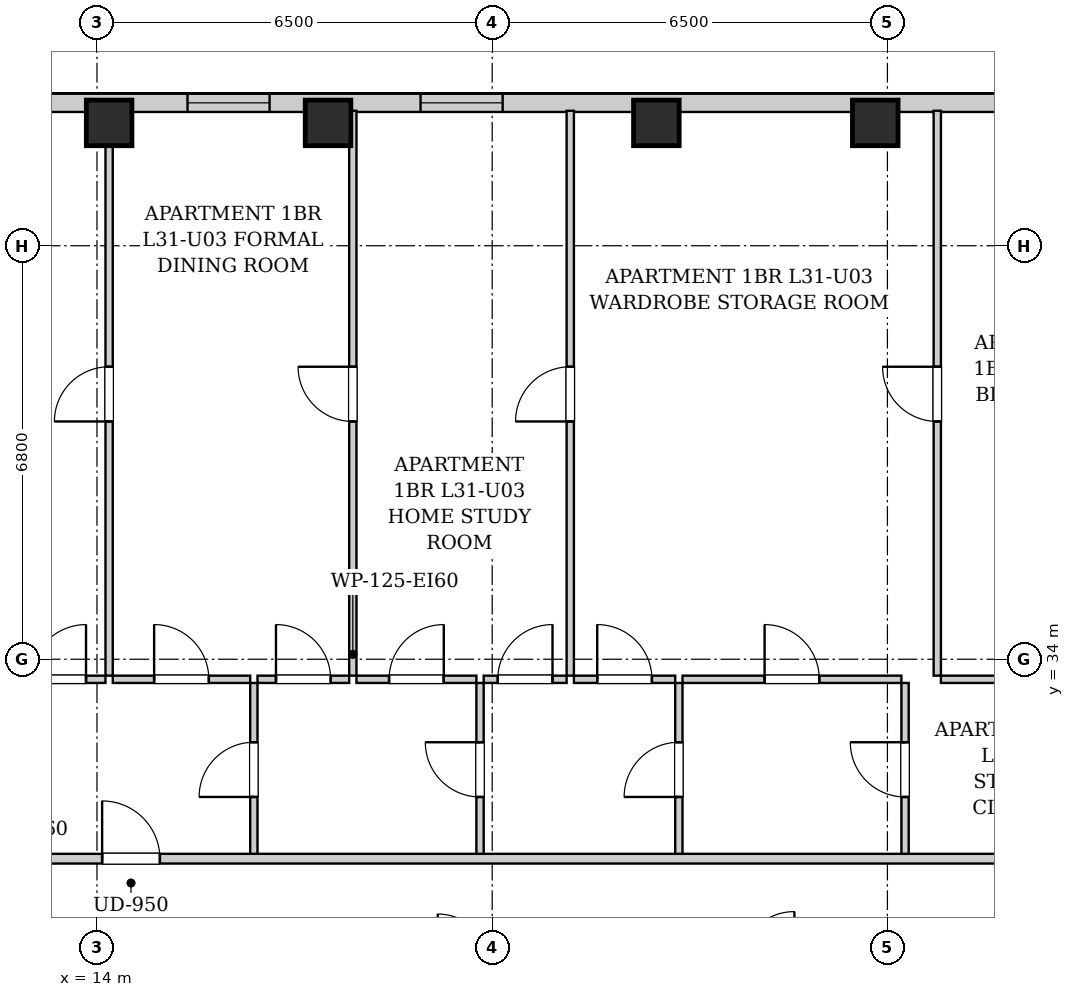
"""IFC4 building model, lengths in metres.
Left out: names, types, materials, properties, quantities, classifications, styles, units other than length and angle.
Written with IfcOpenShell. Run it as: python <this file> out.ifc"""

import sys

from ifc_helpers import new_model, si_unit, direction, frame, frame_2d, origin, origin_2d, place, context, subcontext, project, spatial, rectangle, extrude, element, fill, save


model = new_model("IFC4")
c1 = context("Model", 3, precision=1e-05, world=origin(), true_north=direction((0.0, 1.0)))
c2 = subcontext(c1, "Body", "Model", "MODEL_VIEW")
j1 = project(units=[si_unit("LENGTHUNIT", "METRE"), si_unit("PLANEANGLEUNIT", "RADIAN")], contexts=[c1])
p1 = place(None, origin())
s1 = spatial("IfcSite", under=j1, at=p1, CompositionType="ELEMENT")
p2 = place(p1, origin())
s2 = spatial("IfcBuilding", under=s1, at=p2, CompositionType="ELEMENT")
p3 = place(p2, frame((0.0, 0.0, 110.3)))
s3 = spatial("IfcBuildingStorey", under=s2, at=p3, CompositionType="ELEMENT", Elevation=110.3)
for number, where, z_axis, x_axis in (
    (1, (14.2, 42.82, 0.0), (0.0, 0.0, 1.0), (1.0, 0.0, 0.0)),
    (2, (17.8, 42.82, 0.0), (0.0, 0.0, 1.0), (1.0, 0.0, 0.0)),
    (3, (23.2, 42.82, 0.0), (0.0, 0.0, 1.0), (1.0, 0.0, 0.0)),
    (4, (26.8, 42.82, 0.0), (0.0, 0.0, 1.0), (1.0, 0.0, 0.0)),
):
    element("IfcColumn", number, at=place(p3, frame(where, z_axis=z_axis, x_axis=x_axis)), inside=s3, PredefinedType="COLUMN", context=c2, shape_type="SweptSolid", body=[
        extrude(rectangle(XDim=0.75, YDim=0.75, at=origin_2d()), origin(), (0.0, 0.0, 1.0), 3.2),
    ])
p4 = place(p3, frame((10.0, 43.15, 0.0), z_axis=(0.0, 0.0, 1.0), x_axis=(1.0, 0.0, 0.0)))
e5 = element("IfcWall", 5, at=p4, inside=s3, PredefinedType="SOLIDWALL", context=c2, shape_type="SweptSolid", body=[
    extrude(rectangle(XDim=21.95, YDim=0.3, at=frame_2d((10.975, 0.0))), origin(), (0.0, 0.0, 1.0), 2.94),
])
p5 = place(p4, frame((5.489, 0.0, 0.55)))
e6 = element("IfcOpeningElement", 6, at=p5, cuts=e5, PredefinedType="OPENING", context=c2, shape_type="SweptSolid", body=[
    extrude(rectangle(XDim=1.35, YDim=1.2, at=frame_2d((0.675, 0.6))), frame((0.0, 0.16, 0.0), z_axis=(0.0, -1.0, 0.0), x_axis=(1.0, 0.0, 0.0)), (0.0, 0.0, 1.0), 0.32),
])
p6 = place(p4, frame((9.322, 0.0, 0.55)))
e7 = element("IfcOpeningElement", 7, at=p6, cuts=e5, PredefinedType="OPENING", context=c2, shape_type="SweptSolid", body=[
    extrude(rectangle(XDim=1.35, YDim=1.2, at=frame_2d((0.675, 0.6))), frame((0.0, 0.16, 0.0), z_axis=(0.0, -1.0, 0.0), x_axis=(1.0, 0.0, 0.0)), (0.0, 0.0, 1.0), 0.32),
])
p7 = place(p4, frame((18.869, 0.0, 0.55)))
e8 = element("IfcOpeningElement", 8, at=p7, cuts=e5, PredefinedType="OPENING", context=c2, shape_type="SweptSolid", body=[
    extrude(rectangle(XDim=1.35, YDim=1.2, at=frame_2d((0.675, 0.6))), frame((0.0, 0.16, 0.0), z_axis=(0.0, -1.0, 0.0), x_axis=(1.0, 0.0, 0.0)), (0.0, 0.0, 1.0), 0.32),
])
p8 = place(p3, frame((16.58, 30.76, 0.0), z_axis=(0.0, 0.0, 1.0), x_axis=(0.0, 1.0, 0.0)))
e9 = element("IfcWall", 9, at=p8, inside=s3, PredefinedType="PARTITIONING", context=c2, shape_type="SweptSolid", body=[
    extrude(rectangle(XDim=2.85, YDim=0.12, at=frame_2d((1.425, 0.0))), origin(), (0.0, 0.0, 1.0), 2.94),
])
p9 = place(p8, frame((0.975, 0.0, 0.0)))
e10 = element("IfcOpeningElement", 10, at=p9, cuts=e9, PredefinedType="OPENING", context=c2, shape_type="SweptSolid", body=[
    extrude(rectangle(XDim=0.9, YDim=2.05, at=frame_2d((0.45, 1.025))), frame((0.0, 0.07, 0.0), z_axis=(0.0, -1.0, 0.0), x_axis=(1.0, 0.0, 0.0)), (0.0, 0.0, 1.0), 0.14),
])
p10 = place(p3, frame((12.6, 33.67, 0.0), z_axis=(0.0, 0.0, 1.0), x_axis=(1.0, 0.0, 0.0)))
e11 = element("IfcWall", 11, at=p10, inside=s3, PredefinedType="PARTITIONING", context=c2, shape_type="SweptSolid", body=[
    extrude(rectangle(XDim=1.54, YDim=0.12, at=frame_2d((0.77, 0.0))), origin(), (0.0, 0.0, 1.0), 2.94),
])
p11 = place(p10, frame((0.32, 0.0, 0.0)))
e12 = element("IfcOpeningElement", 12, at=p11, cuts=e11, PredefinedType="OPENING", context=c2, shape_type="SweptSolid", body=[
    extrude(rectangle(XDim=0.9, YDim=2.05, at=frame_2d((0.45, 1.025))), frame((0.0, 0.07, 0.0), z_axis=(0.0, -1.0, 0.0), x_axis=(1.0, 0.0, 0.0)), (0.0, 0.0, 1.0), 0.14),
])
p12 = place(p3, frame((14.26, 33.67, 0.0), z_axis=(0.0, 0.0, 1.0), x_axis=(1.0, 0.0, 0.0)))
e13 = element("IfcWall", 13, at=p12, inside=s3, PredefinedType="PARTITIONING", context=c2, shape_type="SweptSolid", body=[
    extrude(rectangle(XDim=2.26, YDim=0.12, at=frame_2d((1.13, 0.0))), origin(), (0.0, 0.0, 1.0), 2.94),
])
p13 = place(p12, frame((0.68, 0.0, 0.0)))
e14 = element("IfcOpeningElement", 14, at=p13, cuts=e13, PredefinedType="OPENING", context=c2, shape_type="SweptSolid", body=[
    extrude(rectangle(XDim=0.9, YDim=2.05, at=frame_2d((0.45, 1.025))), frame((0.0, 0.07, 0.0), z_axis=(0.0, -1.0, 0.0), x_axis=(1.0, 0.0, 0.0)), (0.0, 0.0, 1.0), 0.14),
])
p14 = place(p3, frame((20.3, 30.76, 0.0), z_axis=(0.0, 0.0, 1.0), x_axis=(0.0, 1.0, 0.0)))
e15 = element("IfcWall", 15, at=p14, inside=s3, PredefinedType="PARTITIONING", context=c2, shape_type="SweptSolid", body=[
    extrude(rectangle(XDim=2.85, YDim=0.12, at=frame_2d((1.425, 0.0))), origin(), (0.0, 0.0, 1.0), 2.94),
])
p15 = place(p14, frame((0.975, 0.0, 0.0)))
e16 = element("IfcOpeningElement", 16, at=p15, cuts=e15, PredefinedType="OPENING", context=c2, shape_type="SweptSolid", body=[
    extrude(rectangle(XDim=0.9, YDim=2.05, at=frame_2d((0.45, 1.025))), frame((0.0, 0.07, 0.0), z_axis=(0.0, -1.0, 0.0), x_axis=(1.0, 0.0, 0.0)), (0.0, 0.0, 1.0), 0.14),
])
p16 = place(p3, frame((16.64, 33.67, 0.0), z_axis=(0.0, 0.0, 1.0), x_axis=(1.0, 0.0, 0.0)))
e17 = element("IfcWall", 17, at=p16, inside=s3, PredefinedType="PARTITIONING", context=c2, shape_type="SweptSolid", body=[
    extrude(rectangle(XDim=1.508, YDim=0.12, at=frame_2d((0.754, 0.0))), origin(), (0.0, 0.0, 1.0), 2.94),
])
p17 = place(p16, frame((0.304, 0.0, 0.0)))
e18 = element("IfcOpeningElement", 18, at=p17, cuts=e17, PredefinedType="OPENING", context=c2, shape_type="SweptSolid", body=[
    extrude(rectangle(XDim=0.9, YDim=2.05, at=frame_2d((0.45, 1.025))), frame((0.0, 0.07, 0.0), z_axis=(0.0, -1.0, 0.0), x_axis=(1.0, 0.0, 0.0)), (0.0, 0.0, 1.0), 0.14),
])
p18 = place(p3, frame((18.268, 33.67, 0.0), z_axis=(0.0, 0.0, 1.0), x_axis=(1.0, 0.0, 0.0)))
e19 = element("IfcWall", 19, at=p18, inside=s3, PredefinedType="PARTITIONING", context=c2, shape_type="SweptSolid", body=[
    extrude(rectangle(XDim=1.972, YDim=0.12, at=frame_2d((0.986, 0.0))), origin(), (0.0, 0.0, 1.0), 2.94),
])
p19 = place(p18, frame((0.536, 0.0, 0.0)))
e20 = element("IfcOpeningElement", 20, at=p19, cuts=e19, PredefinedType="OPENING", context=c2, shape_type="SweptSolid", body=[
    extrude(rectangle(XDim=0.9, YDim=2.05, at=frame_2d((0.45, 1.025))), frame((0.0, 0.07, 0.0), z_axis=(0.0, -1.0, 0.0), x_axis=(1.0, 0.0, 0.0)), (0.0, 0.0, 1.0), 0.14),
])
p20 = place(p3, frame((23.57, 30.76, 0.0), z_axis=(0.0, 0.0, 1.0), x_axis=(0.0, 1.0, 0.0)))
e21 = element("IfcWall", 21, at=p20, inside=s3, PredefinedType="PARTITIONING", context=c2, shape_type="SweptSolid", body=[
    extrude(rectangle(XDim=2.85, YDim=0.12, at=frame_2d((1.425, 0.0))), origin(), (0.0, 0.0, 1.0), 2.94),
])
p21 = place(p20, frame((0.975, 0.0, 0.0)))
e22 = element("IfcOpeningElement", 22, at=p21, cuts=e21, PredefinedType="OPENING", context=c2, shape_type="SweptSolid", body=[
    extrude(rectangle(XDim=0.9, YDim=2.05, at=frame_2d((0.45, 1.025))), frame((0.0, 0.07, 0.0), z_axis=(0.0, -1.0, 0.0), x_axis=(1.0, 0.0, 0.0)), (0.0, 0.0, 1.0), 0.14),
])
p22 = place(p3, frame((20.36, 33.67, 0.0), z_axis=(0.0, 0.0, 1.0), x_axis=(1.0, 0.0, 0.0)))
e23 = element("IfcWall", 23, at=p22, inside=s3, PredefinedType="PARTITIONING", context=c2, shape_type="SweptSolid", body=[
    extrude(rectangle(XDim=1.364, YDim=0.12, at=frame_2d((0.682, 0.0))), origin(), (0.0, 0.0, 1.0), 2.94),
])
p23 = place(p22, frame((0.232, 0.0, 0.0)))
e24 = element("IfcOpeningElement", 24, at=p23, cuts=e23, PredefinedType="OPENING", context=c2, shape_type="SweptSolid", body=[
    extrude(rectangle(XDim=0.9, YDim=2.05, at=frame_2d((0.45, 1.025))), frame((0.0, 0.07, 0.0), z_axis=(0.0, -1.0, 0.0), x_axis=(1.0, 0.0, 0.0)), (0.0, 0.0, 1.0), 0.14),
])
p24 = place(p3, frame((21.844, 33.67, 0.0), z_axis=(0.0, 0.0, 1.0), x_axis=(1.0, 0.0, 0.0)))
e25 = element("IfcWall", 25, at=p24, inside=s3, PredefinedType="PARTITIONING", context=c2, shape_type="SweptSolid", body=[
    extrude(rectangle(XDim=1.666, YDim=0.12, at=frame_2d((0.833, 0.0))), origin(), (0.0, 0.0, 1.0), 2.94),
])
p25 = place(p24, frame((0.383, 0.0, 0.0)))
e26 = element("IfcOpeningElement", 26, at=p25, cuts=e25, PredefinedType="OPENING", context=c2, shape_type="SweptSolid", body=[
    extrude(rectangle(XDim=0.9, YDim=2.05, at=frame_2d((0.45, 1.025))), frame((0.0, 0.07, 0.0), z_axis=(0.0, -1.0, 0.0), x_axis=(1.0, 0.0, 0.0)), (0.0, 0.0, 1.0), 0.14),
])
p26 = place(p3, frame((27.29, 30.76, 0.0), z_axis=(0.0, 0.0, 1.0), x_axis=(0.0, 1.0, 0.0)))
e27 = element("IfcWall", 27, at=p26, inside=s3, PredefinedType="PARTITIONING", context=c2, shape_type="SweptSolid", body=[
    extrude(rectangle(XDim=2.85, YDim=0.12, at=frame_2d((1.425, 0.0))), origin(), (0.0, 0.0, 1.0), 2.94),
])
p27 = place(p26, frame((0.975, 0.0, 0.0)))
e28 = element("IfcOpeningElement", 28, at=p27, cuts=e27, PredefinedType="OPENING", context=c2, shape_type="SweptSolid", body=[
    extrude(rectangle(XDim=0.9, YDim=2.05, at=frame_2d((0.45, 1.025))), frame((0.0, 0.07, 0.0), z_axis=(0.0, -1.0, 0.0), x_axis=(1.0, 0.0, 0.0)), (0.0, 0.0, 1.0), 0.14),
])
p28 = place(p3, frame((23.63, 33.67, 0.0), z_axis=(0.0, 0.0, 1.0), x_axis=(1.0, 0.0, 0.0)))
e29 = element("IfcWall", 29, at=p28, inside=s3, PredefinedType="PARTITIONING", context=c2, shape_type="SweptSolid", body=[
    extrude(rectangle(XDim=3.6, YDim=0.12, at=frame_2d((1.8, 0.0))), origin(), (0.0, 0.0, 1.0), 2.94),
])
p29 = place(p28, frame((1.35, 0.0, 0.0)))
e30 = element("IfcOpeningElement", 30, at=p29, cuts=e29, PredefinedType="OPENING", context=c2, shape_type="SweptSolid", body=[
    extrude(rectangle(XDim=0.9, YDim=2.05, at=frame_2d((0.45, 1.025))), frame((0.0, 0.07, 0.0), z_axis=(0.0, -1.0, 0.0), x_axis=(1.0, 0.0, 0.0)), (0.0, 0.0, 1.0), 0.14),
])
p30 = place(p3, frame((27.88, 33.67, 0.0), z_axis=(0.0, 0.0, 1.0), x_axis=(1.0, 0.0, 0.0)))
e31 = element("IfcWall", 31, at=p30, inside=s3, PredefinedType="PARTITIONING", context=c2, shape_type="SweptSolid", body=[
    extrude(rectangle(XDim=3.24, YDim=0.12, at=frame_2d((1.62, 0.0))), origin(), (0.0, 0.0, 1.0), 2.94),
])
p31 = place(p30, frame((1.17, 0.0, 0.0)))
e32 = element("IfcOpeningElement", 32, at=p31, cuts=e31, PredefinedType="OPENING", context=c2, shape_type="SweptSolid", body=[
    extrude(rectangle(XDim=0.9, YDim=2.05, at=frame_2d((0.45, 1.025))), frame((0.0, 0.07, 0.0), z_axis=(0.0, -1.0, 0.0), x_axis=(1.0, 0.0, 0.0)), (0.0, 0.0, 1.0), 0.14),
])
p32 = place(p3, frame((14.2, 33.73, 0.0), z_axis=(0.0, 0.0, 1.0), x_axis=(0.0, 1.0, 0.0)))
e33 = element("IfcWall", 33, at=p32, inside=s3, PredefinedType="PARTITIONING", context=c2, shape_type="SweptSolid", body=[
    extrude(rectangle(XDim=9.29, YDim=0.12, at=frame_2d((4.645, 0.0))), origin(), (0.0, 0.0, 1.0), 2.94),
])
p33 = place(p32, frame((4.18, 0.0, 0.0)))
e34 = element("IfcOpeningElement", 34, at=p33, cuts=e33, PredefinedType="OPENING", context=c2, shape_type="SweptSolid", body=[
    extrude(rectangle(XDim=0.9, YDim=2.05, at=frame_2d((0.45, 1.025))), frame((0.0, 0.07, 0.0), z_axis=(0.0, -1.0, 0.0), x_axis=(1.0, 0.0, 0.0)), (0.0, 0.0, 1.0), 0.14),
])
p34 = place(p3, frame((18.208, 33.73, 0.0), z_axis=(0.0, 0.0, 1.0), x_axis=(0.0, 1.0, 0.0)))
e35 = element("IfcWall", 35, at=p34, inside=s3, PredefinedType="PARTITIONING", context=c2, shape_type="SweptSolid", body=[
    extrude(rectangle(XDim=9.29, YDim=0.12, at=frame_2d((4.645, 0.0))), origin(), (0.0, 0.0, 1.0), 2.94),
])
p35 = place(p34, frame((4.18, 0.0, 0.0)))
e36 = element("IfcOpeningElement", 36, at=p35, cuts=e35, PredefinedType="OPENING", context=c2, shape_type="SweptSolid", body=[
    extrude(rectangle(XDim=0.9, YDim=2.05, at=frame_2d((0.45, 1.025))), frame((0.0, 0.07, 0.0), z_axis=(0.0, -1.0, 0.0), x_axis=(1.0, 0.0, 0.0)), (0.0, 0.0, 1.0), 0.14),
])
p36 = place(p3, frame((21.784, 33.73, 0.0), z_axis=(0.0, 0.0, 1.0), x_axis=(0.0, 1.0, 0.0)))
e37 = element("IfcWall", 37, at=p36, inside=s3, PredefinedType="PARTITIONING", context=c2, shape_type="SweptSolid", body=[
    extrude(rectangle(XDim=9.29, YDim=0.12, at=frame_2d((4.645, 0.0))), origin(), (0.0, 0.0, 1.0), 2.94),
])
p37 = place(p36, frame((4.18, 0.0, 0.0)))
e38 = element("IfcOpeningElement", 38, at=p37, cuts=e37, PredefinedType="OPENING", context=c2, shape_type="SweptSolid", body=[
    extrude(rectangle(XDim=0.9, YDim=2.05, at=frame_2d((0.45, 1.025))), frame((0.0, 0.07, 0.0), z_axis=(0.0, -1.0, 0.0), x_axis=(1.0, 0.0, 0.0)), (0.0, 0.0, 1.0), 0.14),
])
p38 = place(p3, frame((27.82, 33.73, 0.0), z_axis=(0.0, 0.0, 1.0), x_axis=(0.0, 1.0, 0.0)))
e39 = element("IfcWall", 39, at=p38, inside=s3, PredefinedType="PARTITIONING", context=c2, shape_type="SweptSolid", body=[
    extrude(rectangle(XDim=9.29, YDim=0.12, at=frame_2d((4.645, 0.0))), origin(), (0.0, 0.0, 1.0), 2.94),
])
p39 = place(p38, frame((4.18, 0.0, 0.0)))
e40 = element("IfcOpeningElement", 40, at=p39, cuts=e39, PredefinedType="OPENING", context=c2, shape_type="SweptSolid", body=[
    extrude(rectangle(XDim=0.9, YDim=2.05, at=frame_2d((0.45, 1.025))), frame((0.0, 0.07, 0.0), z_axis=(0.0, -1.0, 0.0), x_axis=(1.0, 0.0, 0.0)), (0.0, 0.0, 1.0), 0.14),
])
p40 = place(p3, frame((10.05, 30.72, 0.0), z_axis=(0.0, 0.0, 1.0), x_axis=(1.0, 0.0, 0.0)))
e41 = element("IfcWall", 41, at=p40, inside=s3, PredefinedType="PARTITIONING", context=c2, shape_type="SweptSolid", body=[
    extrude(rectangle(XDim=30.8, YDim=0.16, at=frame_2d((15.4, 0.0))), origin(), (0.0, 0.0, 1.0), 2.94),
])
p41 = place(p40, frame((4.035, 0.0, 0.0)))
e42 = element("IfcOpeningElement", 42, at=p41, cuts=e41, PredefinedType="OPENING", context=c2, shape_type="SweptSolid", body=[
    extrude(rectangle(XDim=0.95, YDim=2.1, at=frame_2d((0.475, 1.05))), frame((0.0, 0.09, 0.0), z_axis=(0.0, -1.0, 0.0), x_axis=(1.0, 0.0, 0.0)), (0.0, 0.0, 1.0), 0.18),
])
p42 = place(p40, frame((25.11, 0.0, 0.0)))
e43 = element("IfcOpeningElement", 43, at=p42, cuts=e41, PredefinedType="OPENING", context=c2, shape_type="SweptSolid", body=[
    extrude(rectangle(XDim=0.95, YDim=2.1, at=frame_2d((0.475, 1.05))), frame((0.0, 0.09, 0.0), z_axis=(0.0, -1.0, 0.0), x_axis=(1.0, 0.0, 0.0)), (0.0, 0.0, 1.0), 0.18),
])
p43 = place(p9, origin())
e44 = element("IfcDoor", 44, at=p43, inside=s3, OperationType="SINGLE_SWING_LEFT", PredefinedType="DOOR", context=c2, shape_type="SweptSolid", body=[
    extrude(rectangle(XDim=0.9, YDim=2.05, at=frame_2d((0.45, 1.025))), frame((0.0, 0.025, 0.0), z_axis=(0.0, -1.0, 0.0), x_axis=(1.0, 0.0, 0.0)), (0.0, 0.0, 1.0), 0.05),
])
fill(e10, e44)
p44 = place(p11, origin())
e45 = element("IfcDoor", 45, at=p44, inside=s3, OperationType="SINGLE_SWING_RIGHT", PredefinedType="DOOR", context=c2, shape_type="SweptSolid", body=[
    extrude(rectangle(XDim=0.9, YDim=2.05, at=frame_2d((0.45, 1.025))), frame((0.0, 0.025, 0.0), z_axis=(0.0, -1.0, 0.0), x_axis=(1.0, 0.0, 0.0)), (0.0, 0.0, 1.0), 0.05),
])
fill(e12, e45)
p45 = place(p13, origin())
e46 = element("IfcDoor", 46, at=p45, inside=s3, OperationType="SINGLE_SWING_LEFT", PredefinedType="DOOR", context=c2, shape_type="SweptSolid", body=[
    extrude(rectangle(XDim=0.9, YDim=2.05, at=frame_2d((0.45, 1.025))), frame((0.0, 0.025, 0.0), z_axis=(0.0, -1.0, 0.0), x_axis=(1.0, 0.0, 0.0)), (0.0, 0.0, 1.0), 0.05),
])
fill(e14, e46)
p46 = place(p15, origin())
e47 = element("IfcDoor", 47, at=p46, inside=s3, OperationType="SINGLE_SWING_RIGHT", PredefinedType="DOOR", context=c2, shape_type="SweptSolid", body=[
    extrude(rectangle(XDim=0.9, YDim=2.05, at=frame_2d((0.45, 1.025))), frame((0.0, 0.025, 0.0), z_axis=(0.0, -1.0, 0.0), x_axis=(1.0, 0.0, 0.0)), (0.0, 0.0, 1.0), 0.05),
])
fill(e16, e47)
p47 = place(p17, origin())
e48 = element("IfcDoor", 48, at=p47, inside=s3, OperationType="SINGLE_SWING_LEFT", PredefinedType="DOOR", context=c2, shape_type="SweptSolid", body=[
    extrude(rectangle(XDim=0.9, YDim=2.05, at=frame_2d((0.45, 1.025))), frame((0.0, 0.025, 0.0), z_axis=(0.0, -1.0, 0.0), x_axis=(1.0, 0.0, 0.0)), (0.0, 0.0, 1.0), 0.05),
])
fill(e18, e48)
p48 = place(p19, origin())
e49 = element("IfcDoor", 49, at=p48, inside=s3, OperationType="SINGLE_SWING_RIGHT", PredefinedType="DOOR", context=c2, shape_type="SweptSolid", body=[
    extrude(rectangle(XDim=0.9, YDim=2.05, at=frame_2d((0.45, 1.025))), frame((0.0, 0.025, 0.0), z_axis=(0.0, -1.0, 0.0), x_axis=(1.0, 0.0, 0.0)), (0.0, 0.0, 1.0), 0.05),
])
fill(e20, e49)
p49 = place(p21, origin())
e50 = element("IfcDoor", 50, at=p49, inside=s3, OperationType="SINGLE_SWING_LEFT", PredefinedType="DOOR", context=c2, shape_type="SweptSolid", body=[
    extrude(rectangle(XDim=0.9, YDim=2.05, at=frame_2d((0.45, 1.025))), frame((0.0, 0.025, 0.0), z_axis=(0.0, -1.0, 0.0), x_axis=(1.0, 0.0, 0.0)), (0.0, 0.0, 1.0), 0.05),
])
fill(e22, e50)
p50 = place(p23, origin())
e51 = element("IfcDoor", 51, at=p50, inside=s3, OperationType="SINGLE_SWING_RIGHT", PredefinedType="DOOR", context=c2, shape_type="SweptSolid", body=[
    extrude(rectangle(XDim=0.9, YDim=2.05, at=frame_2d((0.45, 1.025))), frame((0.0, 0.025, 0.0), z_axis=(0.0, -1.0, 0.0), x_axis=(1.0, 0.0, 0.0)), (0.0, 0.0, 1.0), 0.05),
])
fill(e24, e51)
p51 = place(p25, origin())
e52 = element("IfcDoor", 52, at=p51, inside=s3, OperationType="SINGLE_SWING_LEFT", PredefinedType="DOOR", context=c2, shape_type="SweptSolid", body=[
    extrude(rectangle(XDim=0.9, YDim=2.05, at=frame_2d((0.45, 1.025))), frame((0.0, 0.025, 0.0), z_axis=(0.0, -1.0, 0.0), x_axis=(1.0, 0.0, 0.0)), (0.0, 0.0, 1.0), 0.05),
])
fill(e26, e52)
p52 = place(p27, origin())
e53 = element("IfcDoor", 53, at=p52, inside=s3, OperationType="SINGLE_SWING_RIGHT", PredefinedType="DOOR", context=c2, shape_type="SweptSolid", body=[
    extrude(rectangle(XDim=0.9, YDim=2.05, at=frame_2d((0.45, 1.025))), frame((0.0, 0.025, 0.0), z_axis=(0.0, -1.0, 0.0), x_axis=(1.0, 0.0, 0.0)), (0.0, 0.0, 1.0), 0.05),
])
fill(e28, e53)
p53 = place(p29, origin())
e54 = element("IfcDoor", 54, at=p53, inside=s3, OperationType="SINGLE_SWING_LEFT", PredefinedType="DOOR", context=c2, shape_type="SweptSolid", body=[
    extrude(rectangle(XDim=0.9, YDim=2.05, at=frame_2d((0.45, 1.025))), frame((0.0, 0.025, 0.0), z_axis=(0.0, -1.0, 0.0), x_axis=(1.0, 0.0, 0.0)), (0.0, 0.0, 1.0), 0.05),
])
fill(e30, e54)
p54 = place(p33, origin())
e55 = element("IfcDoor", 55, at=p54, inside=s3, OperationType="SINGLE_SWING_LEFT", PredefinedType="DOOR", context=c2, shape_type="SweptSolid", body=[
    extrude(rectangle(XDim=0.9, YDim=2.05, at=frame_2d((0.45, 1.025))), frame((0.0, 0.025, 0.0), z_axis=(0.0, -1.0, 0.0), x_axis=(1.0, 0.0, 0.0)), (0.0, 0.0, 1.0), 0.05),
])
fill(e34, e55)
p55 = place(p35, origin())
e56 = element("IfcDoor", 56, at=p55, inside=s3, OperationType="SINGLE_SWING_RIGHT", PredefinedType="DOOR", context=c2, shape_type="SweptSolid", body=[
    extrude(rectangle(XDim=0.9, YDim=2.05, at=frame_2d((0.45, 1.025))), frame((0.0, 0.025, 0.0), z_axis=(0.0, -1.0, 0.0), x_axis=(1.0, 0.0, 0.0)), (0.0, 0.0, 1.0), 0.05),
])
fill(e36, e56)
p56 = place(p37, origin())
e57 = element("IfcDoor", 57, at=p56, inside=s3, OperationType="SINGLE_SWING_LEFT", PredefinedType="DOOR", context=c2, shape_type="SweptSolid", body=[
    extrude(rectangle(XDim=0.9, YDim=2.05, at=frame_2d((0.45, 1.025))), frame((0.0, 0.025, 0.0), z_axis=(0.0, -1.0, 0.0), x_axis=(1.0, 0.0, 0.0)), (0.0, 0.0, 1.0), 0.05),
])
fill(e38, e57)
p57 = place(p39, origin())
e58 = element("IfcDoor", 58, at=p57, inside=s3, OperationType="SINGLE_SWING_RIGHT", PredefinedType="DOOR", context=c2, shape_type="SweptSolid", body=[
    extrude(rectangle(XDim=0.9, YDim=2.05, at=frame_2d((0.45, 1.025))), frame((0.0, 0.025, 0.0), z_axis=(0.0, -1.0, 0.0), x_axis=(1.0, 0.0, 0.0)), (0.0, 0.0, 1.0), 0.05),
])
fill(e40, e58)
p58 = place(p41, origin())
e59 = element("IfcDoor", 59, at=p58, inside=s3, OperationType="SINGLE_SWING_LEFT", PredefinedType="DOOR", context=c2, shape_type="SweptSolid", body=[
    extrude(rectangle(XDim=0.95, YDim=2.1, at=frame_2d((0.475, 1.05))), frame((0.0, 0.025, 0.0), z_axis=(0.0, -1.0, 0.0), x_axis=(1.0, 0.0, 0.0)), (0.0, 0.0, 1.0), 0.05),
])
fill(e42, e59)
p59 = place(p5, origin())
e60 = element("IfcWindow", 60, at=p59, inside=s3, PartitioningType="SINGLE_PANEL", PredefinedType="WINDOW", context=c2, shape_type="SweptSolid", body=[
    extrude(rectangle(XDim=1.35, YDim=1.2, at=frame_2d((0.675, 0.6))), frame((0.0, 0.03, 0.0), z_axis=(0.0, -1.0, 0.0), x_axis=(1.0, 0.0, 0.0)), (0.0, 0.0, 1.0), 0.06),
])
fill(e6, e60)
p60 = place(p6, origin())
e61 = element("IfcWindow", 61, at=p60, inside=s3, PartitioningType="SINGLE_PANEL", PredefinedType="WINDOW", context=c2, shape_type="SweptSolid", body=[
    extrude(rectangle(XDim=1.35, YDim=1.2, at=frame_2d((0.675, 0.6))), frame((0.0, 0.03, 0.0), z_axis=(0.0, -1.0, 0.0), x_axis=(1.0, 0.0, 0.0)), (0.0, 0.0, 1.0), 0.06),
])
fill(e7, e61)
save(model, sys.argv[1])
